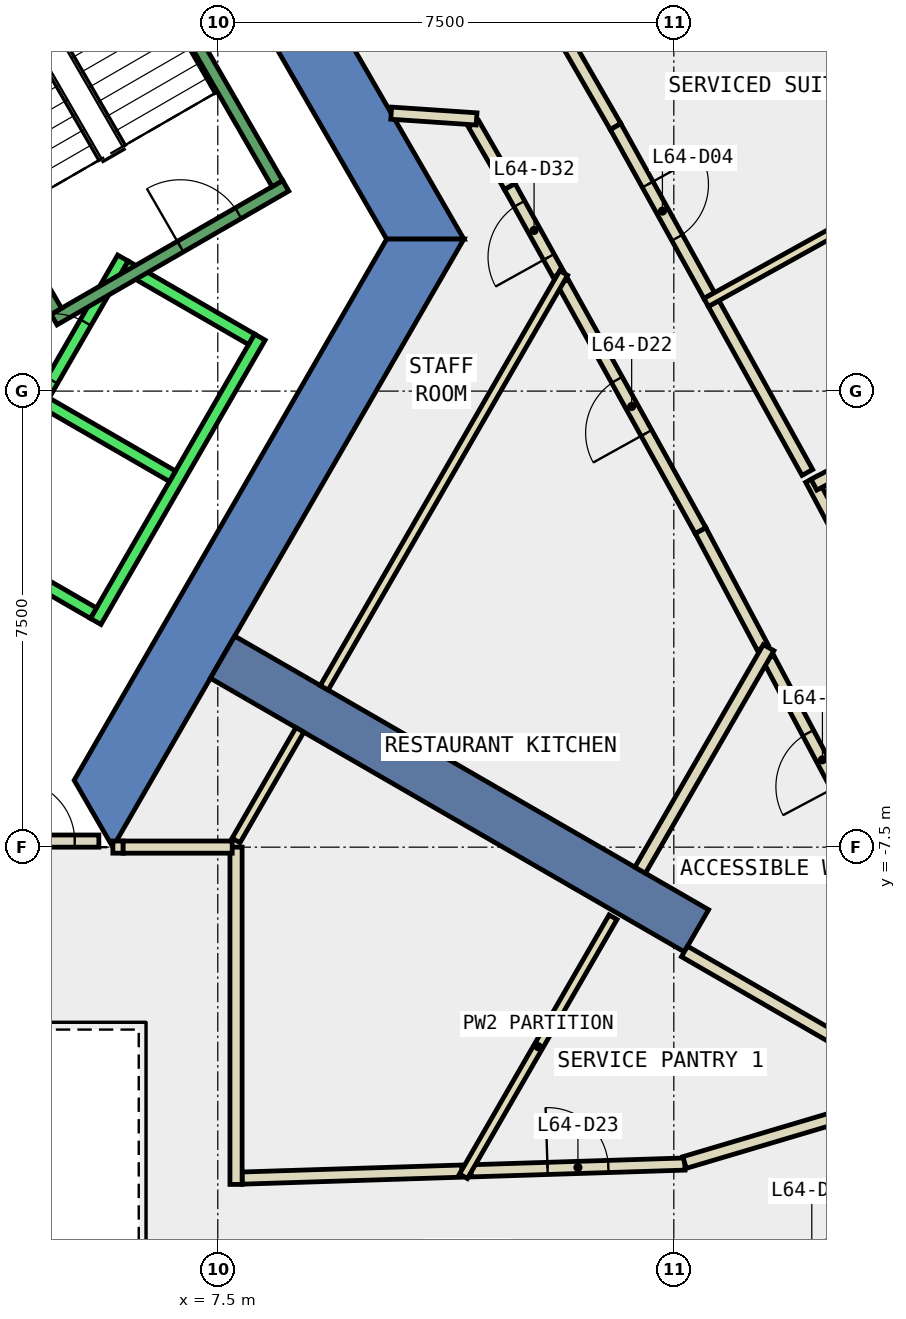
"""IFC4 building model, lengths in metres.
Left out: names, types, materials, properties, quantities, classifications, styles, units other than length and angle.
Written with IfcOpenShell. Run it as: python <this file> out.ifc"""

import sys

from ifc_helpers import new_model, si_unit, direction, frame, frame_2d, origin, place, context, subcontext, project, spatial, polyline, rectangle, outline, extrude, element, fill, save


model = new_model("IFC4")
c1 = context("Model", 3, precision=1e-05, world=origin(), true_north=direction((0.0, 1.0)))
c2 = subcontext(c1, "Body", "Model", "MODEL_VIEW")
j1 = project(units=[si_unit("LENGTHUNIT", "METRE"), si_unit("PLANEANGLEUNIT", "RADIAN")], contexts=[c1])
p1 = place(None, origin())
s1 = spatial("IfcSite", under=j1, at=p1, CompositionType="ELEMENT")
p2 = place(p1, origin())
s2 = spatial("IfcBuilding", under=s1, at=p2, CompositionType="ELEMENT")
p3 = place(p2, frame((0.0, 0.0, 277.4)))
s3 = spatial("IfcBuildingStorey", under=s2, at=p3, CompositionType="ELEMENT", Elevation=277.4)
p4 = place(p3, frame((0.0, 0.0, -0.34)))
e1 = element("IfcWall", 1, at=p4, inside=s3, PredefinedType="SHEAR", context=c2, shape_type="SweptSolid", body=[
    extrude(outline(polyline([(6.786, 10.747), (5.833, 10.197), (10.277, 2.5), (11.547, 2.5), (6.786, 10.747)])), origin(), (0.0, 0.0, 1.0), 3.34),
])
p5 = place(p3, frame((0.0, 0.0, -0.34)))
e2 = element("IfcWall", 2, at=p5, inside=s3, PredefinedType="SHEAR", context=c2, shape_type="SweptSolid", body=[
    extrude(outline(polyline([(5.774, -7.5), (11.547, 2.5), (10.277, 2.5), (5.138, -6.4), (5.774, -7.5)])), origin(), (0.0, 0.0, 1.0), 3.34),
])
p6 = place(p3, frame((7.578, -4.375, -0.34), z_axis=(0.0, 0.0, 1.0), x_axis=(0.866024315419, -0.5000018851, 0.0)))
e3 = element("IfcWall", 3, at=p6, inside=s3, PredefinedType="SHEAR", context=c2, shape_type="SweptSolid", body=[
    extrude(rectangle(XDim=9.0, YDim=0.8, at=frame_2d((4.5, 0.0))), origin(), (0.0, 0.0, 1.0), 3.34),
])
p7 = place(p3, frame((13.102, 1.921, 0.0), z_axis=(0.0, 0.0, 1.0), x_axis=(-0.485065409582, 0.874477871891, 0.0)))
e4 = element("IfcWall", 4, at=p7, inside=s3, PredefinedType="PARTITIONING", context=c2, shape_type="SweptSolid", body=[
    extrude(rectangle(XDim=1.651, YDim=0.2, at=frame_2d((0.826, 0.0))), origin(), (0.0, 0.0, 1.0), 3.0),
])
p8 = place(p7, frame((0.325, 0.0, 0.0)))
e5 = element("IfcOpeningElement", 5, at=p8, cuts=e4, PredefinedType="OPENING", context=c2, shape_type="SweptSolid", body=[
    extrude(rectangle(XDim=1.0, YDim=2.1, at=frame_2d((0.5, 1.05))), frame((0.0, 0.11, 0.0), z_axis=(0.0, -1.0, 0.0), x_axis=(1.0, 0.0, 0.0)), (0.0, 0.0, 1.0), 0.22),
])
p9 = place(p3, frame((12.301, 3.365, 0.0), z_axis=(0.0, 0.0, 1.0), x_axis=(-0.499823064078, 0.86612753369, 0.0)))
e6 = element("IfcWall", 6, at=p9, inside=s3, PredefinedType="PARTITIONING", context=c2, shape_type="SweptSolid", body=[
    extrude(rectangle(XDim=1.19, YDim=0.2, at=frame_2d((0.595, 0.0))), origin(), (0.0, 0.0, 1.0), 3.0),
])
p10 = place(p3, frame((11.756, 4.476, 0.0), z_axis=(0.0, 0.0, 1.0), x_axis=(-0.99772020739, 0.067486204256, 0.0)))
e7 = element("IfcWall", 7, at=p10, inside=s3, PredefinedType="PARTITIONING", context=c2, shape_type="SweptSolid", body=[
    extrude(rectangle(XDim=1.407, YDim=0.2, at=frame_2d((0.704, 0.0))), origin(), (0.0, 0.0, 1.0), 3.0),
])
p11 = place(p3, frame((7.9, -12.942, 0.0), z_axis=(0.0, 0.0, 1.0), x_axis=(0.999494468474, 0.031793198801, 0.0)))
e8 = element("IfcWall", 8, at=p11, inside=s3, PredefinedType="PARTITIONING", context=c2, shape_type="SweptSolid", body=[
    extrude(rectangle(XDim=3.617, YDim=0.2, at=frame_2d((1.808, 0.0))), origin(), (0.0, 0.0, 1.0), 3.0),
])
p12 = place(p3, frame((16.462, -4.217, 0.0), z_axis=(0.0, 0.0, 1.0), x_axis=(-0.469436447461, 0.882966263113, 0.0)))
e9 = element("IfcWall", 9, at=p12, inside=s3, PredefinedType="PARTITIONING", context=c2, shape_type="SweptSolid", body=[
    extrude(rectangle(XDim=2.179, YDim=0.2, at=frame_2d((1.09, 0.0))), origin(), (0.0, 0.0, 1.0), 3.0),
])
p13 = place(p3, frame((15.439, -2.293, 0.0), z_axis=(0.0, 0.0, 1.0), x_axis=(-0.485079003918, 0.874470331091, 0.0)))
e10 = element("IfcWall", 10, at=p13, inside=s3, PredefinedType="PARTITIONING", context=c2, shape_type="SweptSolid", body=[
    extrude(rectangle(XDim=4.669, YDim=0.2, at=frame_2d((2.334, 0.0))), origin(), (0.0, 0.0, 1.0), 3.0),
])
p14 = place(p13, frame((1.834, 0.0, 0.0)))
e11 = element("IfcOpeningElement", 11, at=p14, cuts=e10, PredefinedType="OPENING", context=c2, shape_type="SweptSolid", body=[
    extrude(rectangle(XDim=1.0, YDim=2.1, at=frame_2d((0.5, 1.05))), frame((0.0, 0.11, 0.0), z_axis=(0.0, -1.0, 0.0), x_axis=(1.0, 0.0, 0.0)), (0.0, 0.0, 1.0), 0.22),
])
p15 = place(p3, frame((11.665, -12.823, 0.0), z_axis=(0.0, 0.0, 1.0), x_axis=(0.99949244941, 0.03185660956, 0.0)))
e12 = element("IfcWall", 12, at=p15, inside=s3, PredefinedType="PARTITIONING", context=c2, shape_type="SweptSolid", body=[
    extrude(rectangle(XDim=3.518, YDim=0.2, at=frame_2d((1.759, 0.0))), origin(), (0.0, 0.0, 1.0), 3.0),
])
p16 = place(p15, frame((1.259, 0.0, 0.0)))
e13 = element("IfcOpeningElement", 13, at=p16, cuts=e12, PredefinedType="OPENING", context=c2, shape_type="SweptSolid", body=[
    extrude(rectangle(XDim=1.0, YDim=2.1, at=frame_2d((0.5, 1.05))), frame((0.0, 0.11, 0.0), z_axis=(0.0, -1.0, 0.0), x_axis=(1.0, 0.0, 0.0)), (0.0, 0.0, 1.0), 0.22),
])
p17 = place(p3, frame((15.177, -12.686, 0.0), z_axis=(0.0, 0.0, 1.0), x_axis=(0.958629704259, 0.284656090947, 0.0)))
e14 = element("IfcWall", 14, at=p17, inside=s3, PredefinedType="PARTITIONING", context=c2, shape_type="SweptSolid", body=[
    extrude(rectangle(XDim=2.972, YDim=0.2, at=frame_2d((1.486, 0.0))), origin(), (0.0, 0.0, 1.0), 3.0),
])
p18 = place(p3, frame((18.332, -7.733, 0.0), z_axis=(0.0, 0.0, 1.0), x_axis=(-0.469639737924, 0.882858152006, 0.0)))
e15 = element("IfcWall", 15, at=p18, inside=s3, PredefinedType="PARTITIONING", context=c2, shape_type="SweptSolid", body=[
    extrude(rectangle(XDim=3.782, YDim=0.2, at=frame_2d((1.891, 0.0))), origin(), (0.0, 0.0, 1.0), 3.0),
])
p19 = place(p18, frame((1.391, 0.0, 0.0)))
e16 = element("IfcOpeningElement", 16, at=p19, cuts=e15, PredefinedType="OPENING", context=c2, shape_type="SweptSolid", body=[
    extrude(rectangle(XDim=1.0, YDim=2.1, at=frame_2d((0.5, 1.05))), frame((0.0, 0.11, 0.0), z_axis=(0.0, -1.0, 0.0), x_axis=(1.0, 0.0, 0.0)), (0.0, 0.0, 1.0), 0.22),
])
p20 = place(p3, frame((19.04, -13.626, 0.0), z_axis=(0.0, 0.0, 1.0), x_axis=(-0.958734738219, -0.284302131073, 0.0)))
e17 = element("IfcWall", 17, at=p20, inside=s3, PredefinedType="PARTITIONING", context=c2, shape_type="SweptSolid", body=[
    extrude(rectangle(XDim=3.693, YDim=0.2, at=frame_2d((1.847, 0.0))), origin(), (0.0, 0.0, 1.0), 3.0),
])
p21 = place(p20, frame((0.947, 0.0, 0.0)))
e18 = element("IfcOpeningElement", 18, at=p21, cuts=e17, PredefinedType="OPENING", context=c2, shape_type="SweptSolid", body=[
    extrude(rectangle(XDim=1.8, YDim=2.1, at=frame_2d((0.9, 1.05))), frame((0.0, 0.11, 0.0), z_axis=(0.0, -1.0, 0.0), x_axis=(1.0, 0.0, 0.0)), (0.0, 0.0, 1.0), 0.22),
])
p22 = place(p3, frame((15.655, 1.44, 0.0), z_axis=(0.0, 0.0, 1.0), x_axis=(0.485107756493, -0.87445438108, 0.0)))
e19 = element("IfcWall", 19, at=p22, inside=s3, PredefinedType="PARTITIONING", context=c2, shape_type="SweptSolid", body=[
    extrude(rectangle(XDim=3.177, YDim=0.2, at=frame_2d((1.588, 0.0))), origin(), (0.0, 0.0, 1.0), 3.0),
])
p23 = place(p3, frame((17.257, -1.452, 0.0), z_axis=(0.0, 0.0, 1.0), x_axis=(0.469561695117, -0.882899662747, 0.0)))
e20 = element("IfcWall", 20, at=p23, inside=s3, PredefinedType="PARTITIONING", context=c2, shape_type="SweptSolid", body=[
    extrude(rectangle(XDim=3.0, YDim=0.2, at=frame_2d((1.5, 0.0))), origin(), (0.0, 0.0, 1.0), 3.0),
])
p24 = place(p3, frame((12.492, 7.035, 0.0), z_axis=(0.0, 0.0, 1.0), x_axis=(0.49999285859, -0.86602952684, 0.0)))
e21 = element("IfcWall", 21, at=p24, inside=s3, PredefinedType="PARTITIONING", context=c2, shape_type="SweptSolid", body=[
    extrude(rectangle(XDim=3.1, YDim=0.2, at=frame_2d((1.55, 0.0))), origin(), (0.0, 0.0, 1.0), 3.0),
])
p25 = place(p3, frame((14.042, 4.35, 0.0), z_axis=(0.0, 0.0, 1.0), x_axis=(0.484944791944, -0.874544766588, 0.0)))
e22 = element("IfcWall", 22, at=p25, inside=s3, PredefinedType="PARTITIONING", context=c2, shape_type="SweptSolid", body=[
    extrude(rectangle(XDim=3.178, YDim=0.2, at=frame_2d((1.589, 0.0))), origin(), (0.0, 0.0, 1.0), 3.0),
])
p26 = place(p25, frame((1.089, 0.0, 0.0)))
e23 = element("IfcOpeningElement", 23, at=p26, cuts=e22, PredefinedType="OPENING", context=c2, shape_type="SweptSolid", body=[
    extrude(rectangle(XDim=1.0, YDim=2.1, at=frame_2d((0.5, 1.05))), frame((0.0, 0.11, 0.0), z_axis=(0.0, -1.0, 0.0), x_axis=(1.0, 0.0, 0.0)), (0.0, 0.0, 1.0), 0.22),
])
p27 = place(p3, frame((5.775, -7.499, 0.0), z_axis=(0.0, 0.0, 1.0), x_axis=(1.0, 0.0, 0.0)))
e24 = element("IfcWall", 24, at=p27, inside=s3, PredefinedType="PARTITIONING", context=c2, shape_type="SweptSolid", body=[
    extrude(rectangle(XDim=0.169, YDim=0.2, at=frame_2d((0.084, 0.0))), origin(), (0.0, 0.0, 1.0), 2.4),
])
p28 = place(p3, frame((7.8, -7.39, 0.0), z_axis=(0.0, 0.0, 1.0), x_axis=(0.499977374825, 0.866038466041, 0.0)))
e25 = element("IfcWall", 25, at=p28, inside=s3, PredefinedType="PARTITIONING", context=c2, shape_type="SweptSolid", body=[
    extrude(rectangle(XDim=2.1, YDim=0.15, at=frame_2d((1.05, 0.0))), origin(), (0.0, 0.0, 1.0), 3.0),
])
p29 = place(p3, frame((7.8, -7.499, 0.0), z_axis=(0.0, 0.0, 1.0), x_axis=(0.0, -1.0, 0.0)))
e26 = element("IfcWall", 26, at=p29, inside=s3, PredefinedType="PARTITIONING", context=c2, shape_type="SweptSolid", body=[
    extrude(rectangle(XDim=5.547, YDim=0.2, at=frame_2d((2.773, 0.0))), origin(), (0.0, 0.0, 1.0), 3.0),
])
p30 = place(p3, frame((14.0, -8.652, 0.0), z_axis=(0.0, 0.0, 1.0), x_axis=(-0.500067562424, -0.865986393087, 0.0)))
e27 = element("IfcWall", 27, at=p30, inside=s3, PredefinedType="PARTITIONING", context=c2, shape_type="SweptSolid", body=[
    extrude(rectangle(XDim=4.919, YDim=0.15, at=frame_2d((2.459, 0.0))), origin(), (0.0, 0.0, 1.0), 3.0),
])
p31 = place(p3, frame((16.559, -4.219, 0.0), z_axis=(0.0, 0.0, 1.0), x_axis=(-0.499997491977, -0.866026851788, 0.0)))
e28 = element("IfcWall", 28, at=p31, inside=s3, PredefinedType="PARTITIONING", context=c2, shape_type="SweptSolid", body=[
    extrude(rectangle(XDim=4.226, YDim=0.2, at=frame_2d((2.113, 0.0))), origin(), (0.0, 0.0, 1.0), 3.0),
])
p32 = place(p3, frame((15.176, -9.215, 0.0), z_axis=(0.0, 0.0, 1.0), x_axis=(0.866006068523, -0.500033488159, 0.0)))
e29 = element("IfcWall", 29, at=p32, inside=s3, PredefinedType="PARTITIONING", context=c2, shape_type="SweptSolid", body=[
    extrude(rectangle(XDim=4.099, YDim=0.2, at=frame_2d((2.05, 0.0))), origin(), (0.0, 0.0, 1.0), 3.0),
])
p33 = place(p3, frame((19.511, -0.367, 0.0), z_axis=(0.0, 0.0, 1.0), x_axis=(-0.883014523832, -0.46934566228, 0.0)))
e30 = element("IfcWall", 30, at=p33, inside=s3, PredefinedType="PARTITIONING", context=c2, shape_type="SweptSolid", body=[
    extrude(rectangle(XDim=2.5, YDim=0.2, at=frame_2d((1.25, 0.0))), origin(), (0.0, 0.0, 1.0), 3.0),
])
p34 = place(p3, frame((15.532, 1.457, 0.0), z_axis=(0.0, 0.0, 1.0), x_axis=(0.874467143452, 0.485084750351, 0.0)))
e31 = element("IfcWall", 31, at=p34, inside=s3, PredefinedType="PARTITIONING", context=c2, shape_type="SweptSolid", body=[
    extrude(rectangle(XDim=6.5, YDim=0.15, at=frame_2d((3.25, 0.0))), origin(), (0.0, 0.0, 1.0), 3.0),
])
p35 = place(p3, frame((3.75, -7.4, 0.0), z_axis=(0.0, 0.0, 1.0), x_axis=(1.0, 0.0, 0.0)))
e32 = element("IfcWall", 32, at=p35, inside=s3, PredefinedType="PARTITIONING", context=c2, shape_type="SweptSolid", body=[
    extrude(rectangle(XDim=1.794, YDim=0.2, at=frame_2d((0.897, 0.0))), origin(), (0.0, 0.0, 1.0), 2.4),
])
p36 = place(p35, frame((0.397, 0.0, 0.0)))
e33 = element("IfcOpeningElement", 33, at=p36, cuts=e32, PredefinedType="OPENING", context=c2, shape_type="SweptSolid", body=[
    extrude(rectangle(XDim=1.0, YDim=2.1, at=frame_2d((0.5, 1.05))), frame((0.0, 0.11, 0.0), z_axis=(0.0, -1.0, 0.0), x_axis=(1.0, 0.0, 0.0)), (0.0, 0.0, 1.0), 0.22),
])
p37 = place(p3, frame((9.25, -4.879, 0.0), z_axis=(0.0, 0.0, 1.0), x_axis=(0.499999725187, 0.866025562448, 0.0)))
e34 = element("IfcWall", 34, at=p37, inside=s3, PredefinedType="PARTITIONING", context=c2, shape_type="SweptSolid", body=[
    extrude(rectangle(XDim=7.876, YDim=0.15, at=frame_2d((3.938, 0.0))), origin(), (0.0, 0.0, 1.0), 3.0),
])
p38 = place(p3, frame((5.944, -7.499, 0.0), z_axis=(0.0, 0.0, 1.0), x_axis=(1.0, 0.0, 0.0)))
e35 = element("IfcWall", 35, at=p38, inside=s3, PredefinedType="PARTITIONING", context=c2, shape_type="SweptSolid", body=[
    extrude(rectangle(XDim=1.793, YDim=0.2, at=frame_2d((0.896, 0.0))), origin(), (0.0, 0.0, 1.0), 3.0),
])
p39 = place(p3, frame((3.24, -2.488, 0.0), z_axis=(0.0, 0.0, 1.0), x_axis=(0.500034260056, 0.866005622828, 0.0)))
e36 = element("IfcWall", 36, at=p39, inside=s3, PredefinedType="STANDARD", context=c2, shape_type="SweptSolid", body=[
    extrude(rectangle(XDim=5.399, YDim=0.2, at=frame_2d((2.7, 0.0))), origin(), (0.0, 0.0, 1.0), 3.0),
])
p40 = place(p39, frame((3.075, 0.0, 0.0)))
e37 = element("IfcOpeningElement", 37, at=p40, cuts=e36, PredefinedType="OPENING", context=c2, shape_type="SweptSolid", body=[
    extrude(rectangle(XDim=1.1, YDim=2.1, at=frame_2d((0.55, 1.05))), frame((0.0, 0.11, 0.0), z_axis=(0.0, -1.0, 0.0), x_axis=(1.0, 0.0, 0.0)), (0.0, 0.0, 1.0), 0.22),
])
p41 = place(p39, frame((1.225, 0.0, 0.0)))
e38 = element("IfcOpeningElement", 38, at=p41, cuts=e36, PredefinedType="OPENING", context=c2, shape_type="SweptSolid", body=[
    extrude(rectangle(XDim=1.1, YDim=2.1, at=frame_2d((0.55, 1.05))), frame((0.0, 0.11, 0.0), z_axis=(0.0, -1.0, 0.0), x_axis=(1.0, 0.0, 0.0)), (0.0, 0.0, 1.0), 0.22),
])
p42 = place(p3, frame((5.492, -3.788, 0.0), z_axis=(0.0, 0.0, 1.0), x_axis=(0.500034260056, 0.866005622828, 0.0)))
e39 = element("IfcWall", 39, at=p42, inside=s3, PredefinedType="STANDARD", context=c2, shape_type="SweptSolid", body=[
    extrude(rectangle(XDim=5.399, YDim=0.2, at=frame_2d((2.7, 0.0))), origin(), (0.0, 0.0, 1.0), 3.0),
])
p43 = place(p3, frame((3.377, -2.452, 0.0), z_axis=(0.0, 0.0, 1.0), x_axis=(0.865955154139, -0.50012165622, 0.0)))
e40 = element("IfcWall", 40, at=p43, inside=s3, PredefinedType="STANDARD", context=c2, shape_type="SweptSolid", body=[
    extrude(rectangle(XDim=2.4, YDim=0.2, at=frame_2d((1.2, 0.0))), origin(), (0.0, 0.0, 1.0), 3.0),
])
for number, where, z_axis, x_axis in (
    (41, (4.677, -0.2, 0.0), (0.0, 0.0, 1.0), (0.866, -0.5, 0.0)),
    (42, (5.977, 2.052, 0.0), (0.0, 0.0, 1.0), (0.866, -0.5, 0.0)),
):
    element("IfcWall", number, at=place(p3, frame(where, z_axis=z_axis, x_axis=x_axis)), inside=s3, PredefinedType="STANDARD", context=c2, shape_type="SweptSolid", body=[
        extrude(rectangle(XDim=2.399, YDim=0.2, at=frame_2d((1.2, 0.0))), origin(), (0.0, 0.0, 1.0), 3.0),
    ])
p44 = place(p3, frame((4.806, 1.176, 0.0), z_axis=(0.0, 0.0, 1.0), x_axis=(0.866059941101, 0.499940174841, 0.0)))
e43 = element("IfcWall", 43, at=p44, inside=s3, PredefinedType="STANDARD", context=c2, shape_type="SweptSolid", body=[
    extrude(rectangle(XDim=4.4, YDim=0.2, at=frame_2d((2.2, 0.0))), origin(), (0.0, 0.0, 1.0), 3.0),
])
p45 = place(p44, frame((2.4, 0.0, 0.0)))
e44 = element("IfcOpeningElement", 44, at=p45, cuts=e43, PredefinedType="OPENING", context=c2, shape_type="SweptSolid", body=[
    extrude(rectangle(XDim=1.1, YDim=2.2, at=frame_2d((0.55, 1.1))), frame((0.0, 0.11, 0.0), z_axis=(0.0, -1.0, 0.0), x_axis=(1.0, 0.0, 0.0)), (0.0, 0.0, 1.0), 0.22),
])
p46 = place(p3, frame((4.843, 1.312, 0.0), z_axis=(0.0, 0.0, 1.0), x_axis=(-0.499963383562, 0.866046543262, 0.0)))
e45 = element("IfcWall", 45, at=p46, inside=s3, PredefinedType="STANDARD", context=c2, shape_type="SweptSolid", body=[
    extrude(rectangle(XDim=6.9, YDim=0.2, at=frame_2d((3.45, 0.0))), origin(), (0.0, 0.0, 1.0), 3.0),
])
p47 = place(p46, frame((0.45, 0.0, 0.0)))
e46 = element("IfcOpeningElement", 46, at=p47, cuts=e45, PredefinedType="OPENING", context=c2, shape_type="SweptSolid", body=[
    extrude(rectangle(XDim=1.1, YDim=2.2, at=frame_2d((0.55, 1.1))), frame((0.0, 0.11, 0.0), z_axis=(0.0, -1.0, 0.0), x_axis=(1.0, 0.0, 0.0)), (0.0, 0.0, 1.0), 0.22),
])
p48 = place(p3, frame((8.48, 3.412, 0.0), z_axis=(0.0, 0.0, 1.0), x_axis=(-0.499978703459, 0.866037698999, 0.0)))
e47 = element("IfcWall", 47, at=p48, inside=s3, PredefinedType="STANDARD", context=c2, shape_type="SweptSolid", body=[
    extrude(rectangle(XDim=6.9, YDim=0.2, at=frame_2d((3.45, 0.0))), origin(), (0.0, 0.0, 1.0), 3.0),
])
p49 = place(p26, origin())
e48 = element("IfcDoor", 48, at=p49, inside=s3, OperationType="SINGLE_SWING_LEFT", PredefinedType="DOOR", context=c2, shape_type="SweptSolid", body=[
    extrude(rectangle(XDim=1.0, YDim=2.1, at=frame_2d((0.5, 1.05))), frame((0.0, 0.025, 0.0), z_axis=(0.0, -1.0, 0.0), x_axis=(1.0, 0.0, 0.0)), (0.0, 0.0, 1.0), 0.05),
])
fill(e23, e48)
p50 = place(p21, origin())
e49 = element("IfcDoor", 49, at=p50, inside=s3, OperationType="DOUBLE_DOOR_SINGLE_SWING", PredefinedType="DOOR", context=c2, shape_type="SweptSolid", body=[
    extrude(rectangle(XDim=1.8, YDim=2.1, at=frame_2d((0.9, 1.05))), frame((0.0, 0.025, 0.0), z_axis=(0.0, -1.0, 0.0), x_axis=(1.0, 0.0, 0.0)), (0.0, 0.0, 1.0), 0.05),
])
fill(e18, e49)
p51 = place(p14, origin())
e50 = element("IfcDoor", 50, at=p51, inside=s3, OperationType="SINGLE_SWING_LEFT", PredefinedType="DOOR", context=c2, shape_type="SweptSolid", body=[
    extrude(rectangle(XDim=1.0, YDim=2.1, at=frame_2d((0.5, 1.05))), frame((0.0, 0.025, 0.0), z_axis=(0.0, -1.0, 0.0), x_axis=(1.0, 0.0, 0.0)), (0.0, 0.0, 1.0), 0.05),
])
fill(e11, e50)
p52 = place(p16, origin())
e51 = element("IfcDoor", 51, at=p52, inside=s3, OperationType="SINGLE_SWING_RIGHT", PredefinedType="DOOR", context=c2, shape_type="SweptSolid", body=[
    extrude(rectangle(XDim=1.0, YDim=2.1, at=frame_2d((0.5, 1.05))), frame((0.0, 0.025, 0.0), z_axis=(0.0, -1.0, 0.0), x_axis=(1.0, 0.0, 0.0)), (0.0, 0.0, 1.0), 0.05),
])
fill(e13, e51)
p53 = place(p19, origin())
e52 = element("IfcDoor", 52, at=p53, inside=s3, OperationType="SINGLE_SWING_RIGHT", PredefinedType="DOOR", context=c2, shape_type="SweptSolid", body=[
    extrude(rectangle(XDim=1.0, YDim=2.1, at=frame_2d((0.5, 1.05))), frame((0.0, 0.025, 0.0), z_axis=(0.0, -1.0, 0.0), x_axis=(1.0, 0.0, 0.0)), (0.0, 0.0, 1.0), 0.05),
])
fill(e16, e52)
p54 = place(p8, origin())
e53 = element("IfcDoor", 53, at=p54, inside=s3, OperationType="SINGLE_SWING_RIGHT", PredefinedType="DOOR", context=c2, shape_type="SweptSolid", body=[
    extrude(rectangle(XDim=1.0, YDim=2.1, at=frame_2d((0.5, 1.05))), frame((0.0, 0.025, 0.0), z_axis=(0.0, -1.0, 0.0), x_axis=(1.0, 0.0, 0.0)), (0.0, 0.0, 1.0), 0.05),
])
fill(e5, e53)
p55 = place(p36, origin())
e54 = element("IfcDoor", 54, at=p55, inside=s3, OperationType="SINGLE_SWING_LEFT", PredefinedType="DOOR", context=c2, shape_type="SweptSolid", body=[
    extrude(rectangle(XDim=1.0, YDim=2.1, at=frame_2d((0.5, 1.05))), frame((0.0, 0.025, 0.0), z_axis=(0.0, -1.0, 0.0), x_axis=(1.0, 0.0, 0.0)), (0.0, 0.0, 1.0), 0.05),
])
fill(e33, e54)
p56 = place(p40, origin())
e55 = element("IfcDoor", 55, at=p56, inside=s3, OperationType="SLIDING_TO_LEFT", PredefinedType="DOOR", context=c2, shape_type="SweptSolid", body=[
    extrude(rectangle(XDim=1.1, YDim=2.1, at=frame_2d((0.55, 1.05))), frame((0.0, 0.025, 0.0), z_axis=(0.0, -1.0, 0.0), x_axis=(1.0, 0.0, 0.0)), (0.0, 0.0, 1.0), 0.05),
])
fill(e37, e55)
p57 = place(p45, origin())
e56 = element("IfcDoor", 56, at=p57, inside=s3, OperationType="SINGLE_SWING_LEFT", PredefinedType="DOOR", context=c2, shape_type="SweptSolid", body=[
    extrude(rectangle(XDim=1.1, YDim=2.2, at=frame_2d((0.55, 1.1))), frame((0.0, 0.025, 0.0), z_axis=(0.0, -1.0, 0.0), x_axis=(1.0, 0.0, 0.0)), (0.0, 0.0, 1.0), 0.05),
])
fill(e44, e56)
save(model, sys.argv[1])
